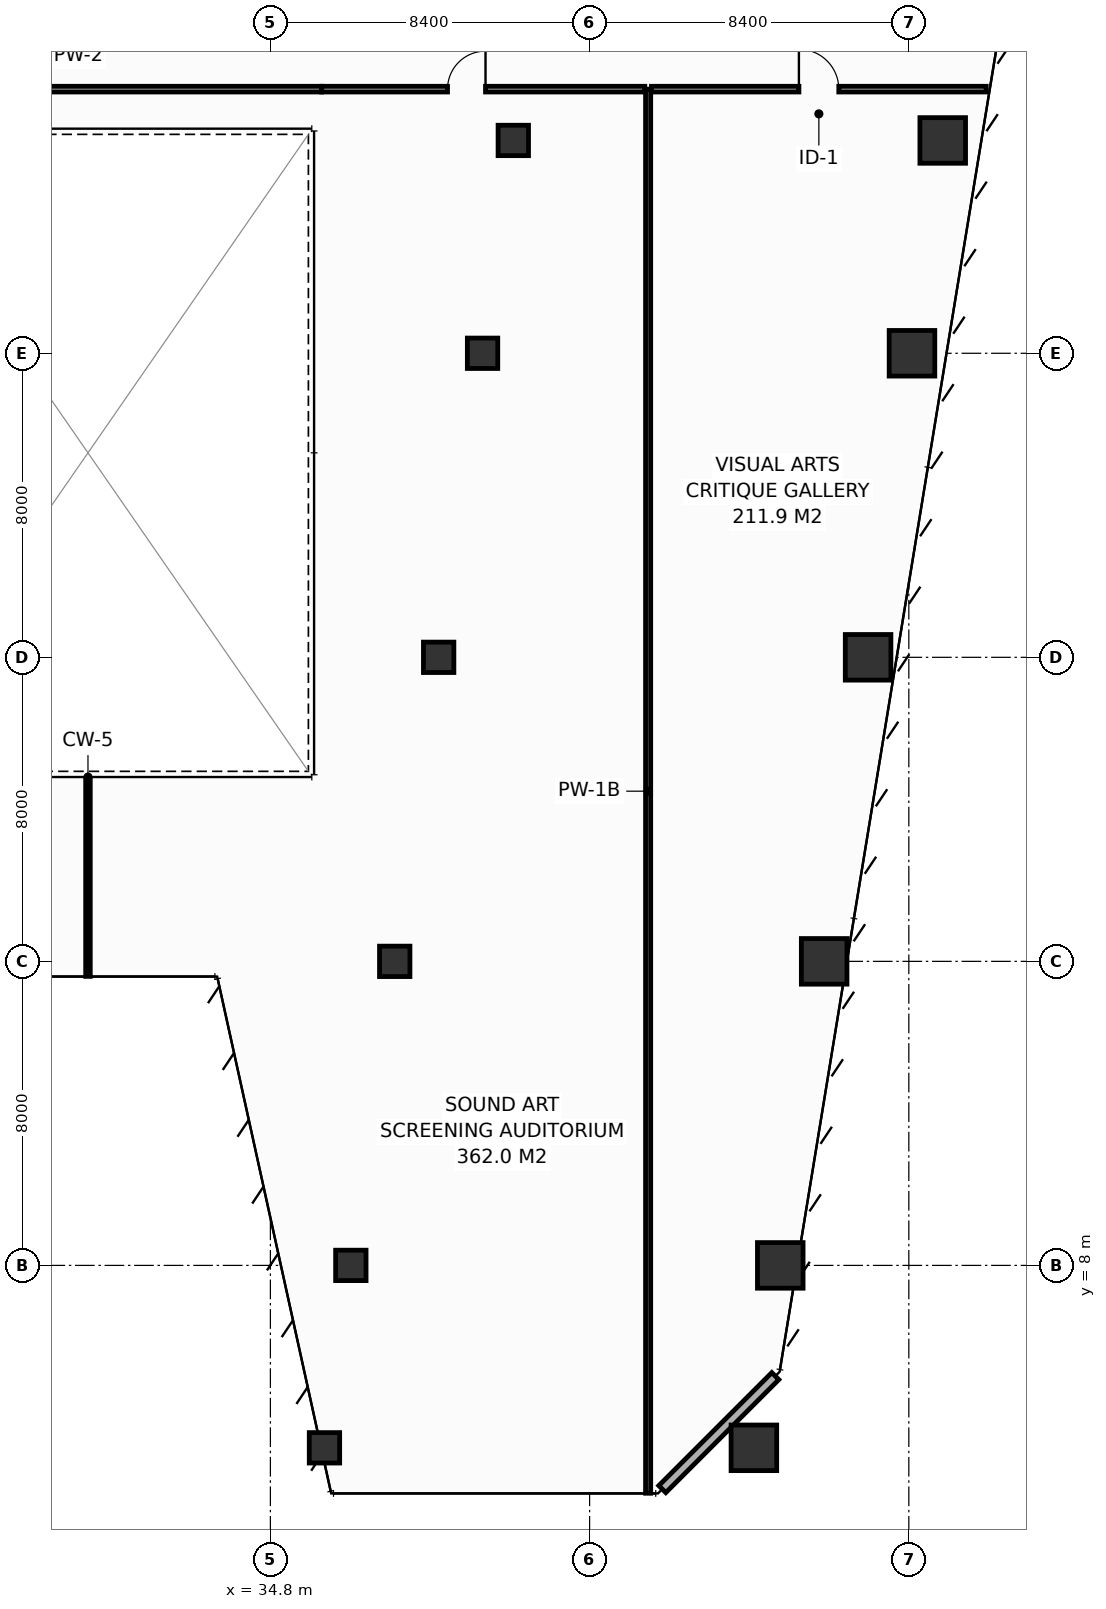
"""IFC4 building model, lengths in metres.
Left out: names, types, materials, properties, quantities, classifications, styles, units other than length and angle.
Written with IfcOpenShell. Run it as: python <this file> out.ifc"""

import sys

from ifc_helpers import new_model, si_unit, direction, frame, frame_2d, origin, origin_2d, place, context, subcontext, project, spatial, rectangle, hollow_rectangle, extrude, element, fill, save


model = new_model("IFC4")
c1 = context("Model", 3, precision=1e-05, world=origin(), true_north=direction((0.0, 1.0)))
c2 = subcontext(c1, "Body", "Model", "MODEL_VIEW")
j1 = project(units=[si_unit("LENGTHUNIT", "METRE"), si_unit("PLANEANGLEUNIT", "RADIAN")], contexts=[c1])
p1 = place(None, origin())
s1 = spatial("IfcSite", under=j1, at=p1, CompositionType="ELEMENT")
p2 = place(p1, origin())
s2 = spatial("IfcBuilding", under=s1, at=p2, CompositionType="ELEMENT")
p3 = place(p2, frame((0.0, 0.0, 78.0)))
s3 = spatial("IfcBuildingStorey", under=s2, at=p3, CompositionType="ELEMENT", Elevation=78.0)
p4 = place(p3, frame((47.523, 3.2, 0.0), z_axis=(0.0, 0.0, 1.0), x_axis=(1.0, 0.0, 0.0)))
e1 = element("IfcColumn", 1, at=p4, inside=s3, PredefinedType="COLUMN", context=c2, shape_type="SweptSolid", body=[
    extrude(hollow_rectangle(XDim=1.2, YDim=1.2, WallThickness=0.055, at=origin_2d()), origin(), (0.0, 0.0, 1.0), 4.4),
])
p5 = place(p3, frame((36.223, 3.2, 0.0), z_axis=(0.0, 0.0, 1.0), x_axis=(1.0, 0.0, 0.0)))
e2 = element("IfcColumn", 2, at=p5, inside=s3, PredefinedType="COLUMN", context=c2, shape_type="SweptSolid", body=[
    extrude(hollow_rectangle(XDim=0.8, YDim=0.8, WallThickness=0.036, at=origin_2d()), origin(), (0.0, 0.0, 1.0), 4.4),
])
p6 = place(p3, frame((48.217, 8.0, 0.0), z_axis=(0.0, 0.0, 1.0), x_axis=(1.0, 0.0, 0.0)))
e3 = element("IfcColumn", 3, at=p6, inside=s3, PredefinedType="COLUMN", context=c2, shape_type="SweptSolid", body=[
    extrude(hollow_rectangle(XDim=1.2, YDim=1.2, WallThickness=0.055, at=origin_2d()), origin(), (0.0, 0.0, 1.0), 4.4),
])
p7 = place(p3, frame((36.917, 8.0, 0.0), z_axis=(0.0, 0.0, 1.0), x_axis=(1.0, 0.0, 0.0)))
e4 = element("IfcColumn", 4, at=p7, inside=s3, PredefinedType="COLUMN", context=c2, shape_type="SweptSolid", body=[
    extrude(hollow_rectangle(XDim=0.8, YDim=0.8, WallThickness=0.036, at=origin_2d()), origin(), (0.0, 0.0, 1.0), 4.4),
])
p8 = place(p3, frame((49.372, 16.0, 0.0), z_axis=(0.0, 0.0, 1.0), x_axis=(1.0, 0.0, 0.0)))
e5 = element("IfcColumn", 5, at=p8, inside=s3, PredefinedType="COLUMN", context=c2, shape_type="SweptSolid", body=[
    extrude(hollow_rectangle(XDim=1.2, YDim=1.2, WallThickness=0.055, at=origin_2d()), origin(), (0.0, 0.0, 1.0), 4.4),
])
p9 = place(p3, frame((38.072, 16.0, 0.0), z_axis=(0.0, 0.0, 1.0), x_axis=(1.0, 0.0, 0.0)))
e6 = element("IfcColumn", 6, at=p9, inside=s3, PredefinedType="COLUMN", context=c2, shape_type="SweptSolid", body=[
    extrude(hollow_rectangle(XDim=0.8, YDim=0.8, WallThickness=0.036, at=origin_2d()), origin(), (0.0, 0.0, 1.0), 4.4),
])
p10 = place(p3, frame((50.528, 24.0, 0.0), z_axis=(0.0, 0.0, 1.0), x_axis=(1.0, 0.0, 0.0)))
e7 = element("IfcColumn", 7, at=p10, inside=s3, PredefinedType="COLUMN", context=c2, shape_type="SweptSolid", body=[
    extrude(hollow_rectangle(XDim=1.2, YDim=1.2, WallThickness=0.055, at=origin_2d()), origin(), (0.0, 0.0, 1.0), 4.4),
])
p11 = place(p3, frame((39.228, 24.0, 0.0), z_axis=(0.0, 0.0, 1.0), x_axis=(1.0, 0.0, 0.0)))
e8 = element("IfcColumn", 8, at=p11, inside=s3, PredefinedType="COLUMN", context=c2, shape_type="SweptSolid", body=[
    extrude(hollow_rectangle(XDim=0.8, YDim=0.8, WallThickness=0.036, at=origin_2d()), origin(), (0.0, 0.0, 1.0), 4.4),
])
p12 = place(p3, frame((51.683, 32.0, 0.0), z_axis=(0.0, 0.0, 1.0), x_axis=(1.0, 0.0, 0.0)))
e9 = element("IfcColumn", 9, at=p12, inside=s3, PredefinedType="COLUMN", context=c2, shape_type="SweptSolid", body=[
    extrude(hollow_rectangle(XDim=1.2, YDim=1.2, WallThickness=0.055, at=origin_2d()), origin(), (0.0, 0.0, 1.0), 4.4),
])
p13 = place(p3, frame((40.383, 32.0, 0.0), z_axis=(0.0, 0.0, 1.0), x_axis=(1.0, 0.0, 0.0)))
e10 = element("IfcColumn", 10, at=p13, inside=s3, PredefinedType="COLUMN", context=c2, shape_type="SweptSolid", body=[
    extrude(hollow_rectangle(XDim=0.8, YDim=0.8, WallThickness=0.036, at=origin_2d()), origin(), (0.0, 0.0, 1.0), 4.4),
])
p14 = place(p3, frame((52.492, 37.6, 0.0), z_axis=(0.0, 0.0, 1.0), x_axis=(1.0, 0.0, 0.0)))
e11 = element("IfcColumn", 11, at=p14, inside=s3, PredefinedType="COLUMN", context=c2, shape_type="SweptSolid", body=[
    extrude(hollow_rectangle(XDim=1.2, YDim=1.2, WallThickness=0.055, at=origin_2d()), origin(), (0.0, 0.0, 1.0), 4.4),
])
p15 = place(p3, frame((41.192, 37.6, 0.0), z_axis=(0.0, 0.0, 1.0), x_axis=(1.0, 0.0, 0.0)))
e12 = element("IfcColumn", 12, at=p15, inside=s3, PredefinedType="COLUMN", context=c2, shape_type="SweptSolid", body=[
    extrude(hollow_rectangle(XDim=0.8, YDim=0.8, WallThickness=0.036, at=origin_2d()), origin(), (0.0, 0.0, 1.0), 4.4),
])
p16 = place(p3, frame((45.113, 2.113, 0.0), z_axis=(0.0, 0.0, 1.0), x_axis=(0.707106781187, 0.707106781187, 0.0)))
e13 = element("IfcWall", 13, at=p16, inside=s3, PredefinedType="STANDARD", context=c2, shape_type="SweptSolid", body=[
    extrude(rectangle(XDim=4.206, YDim=0.26, at=frame_2d((2.103, 0.0))), origin(), (0.0, 0.0, 1.0), 4.15),
])
p17 = place(p3, frame((44.74, 2.005, 0.0), z_axis=(0.0, 0.0, 1.0), x_axis=(0.0, 1.0, 0.0)))
e14 = element("IfcWall", 14, at=p17, inside=s3, PredefinedType="PARTITIONING", context=c2, shape_type="SweptSolid", body=[
    extrude(rectangle(XDim=36.945, YDim=0.135, at=frame_2d((18.473, 0.0))), origin(), (0.0, 0.0, 1.0), 3.335),
])
p18 = place(p3, frame((30.0, 15.605, 0.0), z_axis=(0.0, 0.0, 1.0), x_axis=(0.0, 1.0, 0.0)))
e15 = element("IfcWall", 15, at=p18, inside=s3, PredefinedType="PARTITIONING", context=c2, shape_type="SweptSolid", body=[
    extrude(rectangle(XDim=5.175, YDim=0.12, at=frame_2d((2.587, 0.0))), origin(), (0.0, 0.0, 1.0), 4.15),
])
p19 = place(p3, frame((23.85, 38.95, 0.0), z_axis=(0.0, 0.0, 1.0), x_axis=(1.0, 0.0, 0.0)))
e16 = element("IfcWall", 16, at=p19, inside=s3, PredefinedType="PARTITIONING", context=c2, shape_type="SweptSolid", body=[
    extrude(rectangle(XDim=12.3, YDim=0.15, at=frame_2d((6.15, 0.0))), origin(), (0.0, 0.0, 1.0), 4.15),
])
p20 = place(p3, frame((36.15, 38.95, 0.0), z_axis=(0.0, 0.0, 1.0), x_axis=(1.0, 0.0, 0.0)))
e17 = element("IfcWall", 17, at=p20, inside=s3, PredefinedType="PARTITIONING", context=c2, shape_type="SweptSolid", body=[
    extrude(rectangle(XDim=8.503, YDim=0.15, at=frame_2d((4.251, 0.0))), origin(), (0.0, 0.0, 1.0), 3.335),
])
p21 = place(p20, frame((3.311, 0.0, 0.0)))
e18 = element("IfcOpeningElement", 18, at=p21, cuts=e17, PredefinedType="OPENING", context=c2, shape_type="SweptSolid", body=[
    extrude(rectangle(XDim=1.0, YDim=2.15, at=frame_2d((0.5, 1.075))), frame((0.0, 0.085, 0.0), z_axis=(0.0, -1.0, 0.0), x_axis=(1.0, 0.0, 0.0)), (0.0, 0.0, 1.0), 0.17),
])
p22 = place(p3, frame((44.827, 38.95, 0.0), z_axis=(0.0, 0.0, 1.0), x_axis=(1.0, 0.0, 0.0)))
e19 = element("IfcWall", 19, at=p22, inside=s3, PredefinedType="PARTITIONING", context=c2, shape_type="SweptSolid", body=[
    extrude(rectangle(XDim=8.81, YDim=0.15, at=frame_2d((4.405, 0.0))), origin(), (0.0, 0.0, 1.0), 3.635),
])
p23 = place(p22, frame((3.88, 0.0, 0.0)))
e20 = element("IfcOpeningElement", 20, at=p23, cuts=e19, PredefinedType="OPENING", context=c2, shape_type="SweptSolid", body=[
    extrude(rectangle(XDim=1.05, YDim=2.15, at=frame_2d((0.525, 1.075))), frame((0.0, 0.085, 0.0), z_axis=(0.0, -1.0, 0.0), x_axis=(1.0, 0.0, 0.0)), (0.0, 0.0, 1.0), 0.17),
])
p24 = place(p21, origin())
e21 = element("IfcDoor", 21, at=p24, inside=s3, OperationType="SINGLE_SWING_RIGHT", PredefinedType="DOOR", context=c2, shape_type="SweptSolid", body=[
    extrude(rectangle(XDim=1.0, YDim=2.15, at=frame_2d((0.5, 1.075))), frame((0.0, 0.025, 0.0), z_axis=(0.0, -1.0, 0.0), x_axis=(1.0, 0.0, 0.0)), (0.0, 0.0, 1.0), 0.05),
])
fill(e18, e21)
p25 = place(p23, origin())
e22 = element("IfcDoor", 22, at=p25, inside=s3, OperationType="SINGLE_SWING_LEFT", PredefinedType="DOOR", context=c2, shape_type="SweptSolid", body=[
    extrude(rectangle(XDim=1.05, YDim=2.15, at=frame_2d((0.525, 1.075))), frame((0.0, 0.025, 0.0), z_axis=(0.0, -1.0, 0.0), x_axis=(1.0, 0.0, 0.0)), (0.0, 0.0, 1.0), 0.05),
])
fill(e20, e22)
save(model, sys.argv[1])
